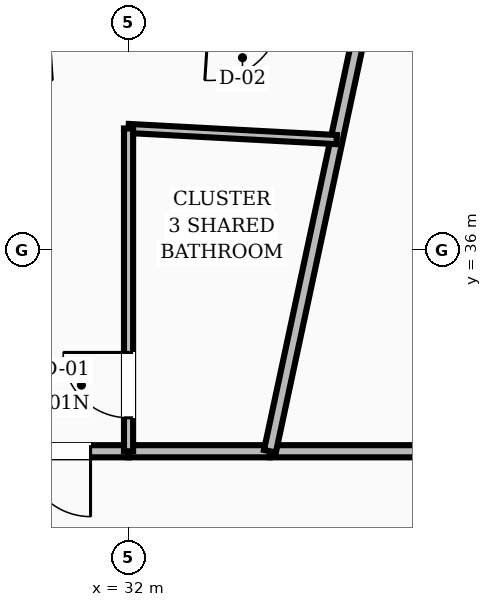
"""IFC4 building model, lengths in metres.
Left out: names, types, materials, properties, quantities, classifications, styles, units other than length and angle.
Written with IfcOpenShell. Run it as: python <this file> out.ifc"""

import sys

from ifc_helpers import new_model, si_unit, direction, frame, frame_2d, origin, place, context, subcontext, project, spatial, rectangle, extrude, element, fill, save


model = new_model("IFC4")
c1 = context("Model", 3, precision=1e-05, world=origin(), true_north=direction((0.0, 1.0)))
c2 = subcontext(c1, "Body", "Model", "MODEL_VIEW")
j1 = project(units=[si_unit("LENGTHUNIT", "METRE"), si_unit("PLANEANGLEUNIT", "RADIAN")], contexts=[c1])
p1 = place(None, origin())
s1 = spatial("IfcSite", under=j1, at=p1, CompositionType="ELEMENT")
p2 = place(p1, origin())
s2 = spatial("IfcBuilding", under=s1, at=p2, CompositionType="ELEMENT")
p3 = place(p2, frame((0.0, 0.0, 236.4)))
s3 = spatial("IfcBuildingStorey", under=s2, at=p3, CompositionType="ELEMENT", Elevation=236.4)
p4 = place(p3, frame((35.873, 33.35, 0.0), z_axis=(0.0, 0.0, 1.0), x_axis=(-1.0, 0.0, 0.0)))
e1 = element("IfcWall", 1, at=p4, inside=s3, PredefinedType="SOLIDWALL", context=c2, shape_type="SweptSolid", body=[
    extrude(rectangle(XDim=2.013, YDim=0.16, at=frame_2d((1.006, 0.0))), origin(), (0.0, 0.0, 1.0), 2.87),
])
p5 = place(p3, frame((33.86, 33.35, 0.0), z_axis=(0.0, 0.0, 1.0), x_axis=(-1.0, 0.0, 0.0)))
e2 = element("IfcWall", 2, at=p5, inside=s3, PredefinedType="SOLIDWALL", context=c2, shape_type="SweptSolid", body=[
    extrude(rectangle(XDim=1.86, YDim=0.16, at=frame_2d((0.93, 0.0))), origin(), (0.0, 0.0, 1.0), 2.87),
])
p6 = place(p3, frame((32.0, 33.35, 0.0), z_axis=(0.0, 0.0, 1.0), x_axis=(-1.0, 0.0, 0.0)))
e3 = element("IfcWall", 3, at=p6, inside=s3, PredefinedType="SOLIDWALL", context=c2, shape_type="SweptSolid", body=[
    extrude(rectangle(XDim=1.86, YDim=0.16, at=frame_2d((0.93, 0.0))), origin(), (0.0, 0.0, 1.0), 2.87),
])
p7 = place(p6, frame((0.5, 0.0, 0.0)))
e4 = element("IfcOpeningElement", 4, at=p7, cuts=e3, PredefinedType="OPENING", context=c2, shape_type="SweptSolid", body=[
    extrude(rectangle(XDim=0.86, YDim=2.1, at=frame_2d((0.43, 1.05))), frame((0.0, 0.09, 0.0), z_axis=(0.0, -1.0, 0.0), x_axis=(1.0, 0.0, 0.0)), (0.0, 0.0, 1.0), 0.18),
])
p8 = place(p3, frame((33.86, 33.35, 0.0), z_axis=(0.0, 0.0, 1.0), x_axis=(0.209408330321, 0.97782828308, 0.0)))
e5 = element("IfcWall", 5, at=p8, inside=s3, PredefinedType="SOLIDWALL", context=c2, shape_type="SweptSolid", body=[
    extrude(rectangle(XDim=11.598, YDim=0.16, at=frame_2d((5.799, 0.0))), origin(), (0.0, 0.0, 1.0), 2.87),
])
p9 = place(p3, frame((34.738, 37.45, 0.0), z_axis=(0.0, 0.0, 1.0), x_axis=(-0.998571697587, 0.053428127212, 0.0)))
e6 = element("IfcWall", 6, at=p9, inside=s3, PredefinedType="PARTITIONING", context=c2, shape_type="SweptSolid", body=[
    extrude(rectangle(XDim=2.742, YDim=0.12, at=frame_2d((1.371, 0.0))), origin(), (0.0, 0.0, 1.0), 2.87),
])
p10 = place(p3, frame((32.0, 33.35, 0.0), z_axis=(0.0, 0.0, 1.0), x_axis=(0.0, 1.0, 0.0)))
e7 = element("IfcWall", 7, at=p10, inside=s3, PredefinedType="PARTITIONING", context=c2, shape_type="SweptSolid", body=[
    extrude(rectangle(XDim=4.247, YDim=0.12, at=frame_2d((2.123, 0.0))), origin(), (0.0, 0.0, 1.0), 2.87),
])
p11 = place(p10, frame((0.44, 0.0, 0.0)))
e8 = element("IfcOpeningElement", 8, at=p11, cuts=e7, PredefinedType="OPENING", context=c2, shape_type="SweptSolid", body=[
    extrude(rectangle(XDim=0.86, YDim=2.1, at=frame_2d((0.43, 1.05))), frame((0.0, 0.07, 0.0), z_axis=(0.0, -1.0, 0.0), x_axis=(1.0, 0.0, 0.0)), (0.0, 0.0, 1.0), 0.14),
])
p12 = place(p11, origin())
e9 = element("IfcDoor", 9, at=p12, inside=s3, OperationType="SINGLE_SWING_RIGHT", PredefinedType="DOOR", context=c2, shape_type="SweptSolid", body=[
    extrude(rectangle(XDim=0.86, YDim=2.1, at=frame_2d((0.43, 1.05))), frame((0.0, 0.025, 0.0), z_axis=(0.0, -1.0, 0.0), x_axis=(1.0, 0.0, 0.0)), (0.0, 0.0, 1.0), 0.05),
])
fill(e8, e9)
p13 = place(p7, origin())
e10 = element("IfcDoor", 10, at=p13, inside=s3, OperationType="SINGLE_SWING_LEFT", PredefinedType="DOOR", context=c2, shape_type="SweptSolid", body=[
    extrude(rectangle(XDim=0.86, YDim=2.1, at=frame_2d((0.43, 1.05))), frame((0.0, 0.025, 0.0), z_axis=(0.0, -1.0, 0.0), x_axis=(1.0, 0.0, 0.0)), (0.0, 0.0, 1.0), 0.05),
])
fill(e4, e10)
save(model, sys.argv[1])
